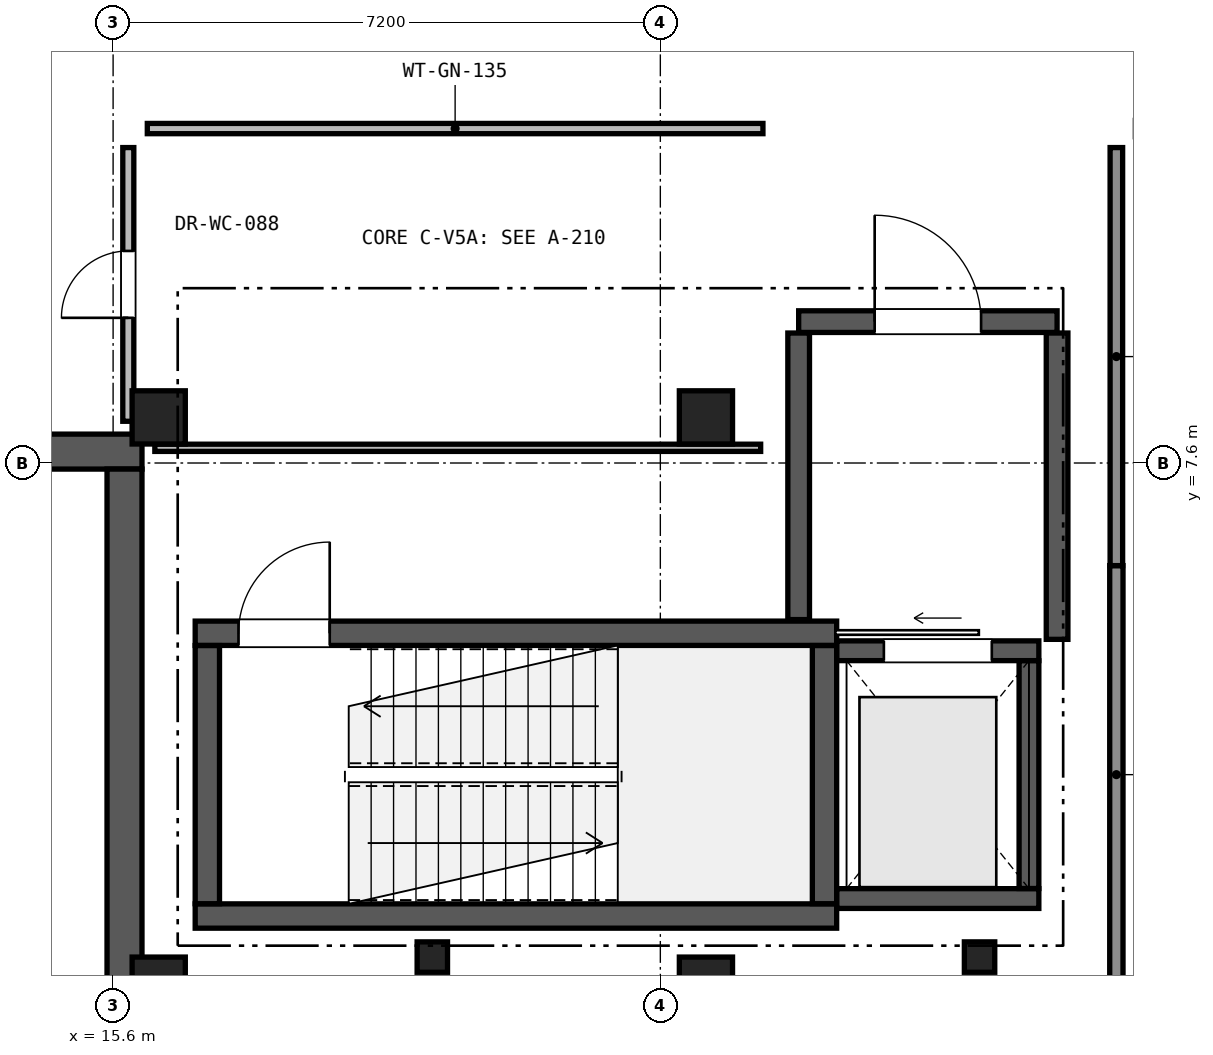
"""IFC4 building model, lengths in metres.
Left out: names, types, materials, properties, quantities, classifications, styles, units other than length and angle.
Written with IfcOpenShell. Run it as: python <this file> out.ifc"""

import sys

from ifc_helpers import new_model, si_unit, direction, frame, frame_2d, origin, origin_2d, place, context, subcontext, project, spatial, rectangle, extrude, element, fill, save


model = new_model("IFC4")
c1 = context("Model", 3, precision=1e-05, world=origin(), true_north=direction((0.0, 1.0)))
c2 = subcontext(c1, "Body", "Model", "MODEL_VIEW")
j1 = project(units=[si_unit("LENGTHUNIT", "METRE"), si_unit("PLANEANGLEUNIT", "RADIAN")], contexts=[c1])
p1 = place(None, origin())
s1 = spatial("IfcSite", under=j1, at=p1, CompositionType="ELEMENT")
p2 = place(p1, origin())
s2 = spatial("IfcBuilding", under=s1, at=p2, CompositionType="ELEMENT")
p3 = place(p2, frame((0.0, 0.0, -4.42)))
s3 = spatial("IfcBuildingStorey", under=s2, at=p3, CompositionType="ELEMENT", Elevation=-4.42)
for number, where, z_axis, x_axis in (
    (1, (16.2, 0.75, 0.0), (0.0, 0.0, 1.0), (1.0, 0.0, 0.0)),
    (2, (16.2, 8.2, 0.0), (0.0, 0.0, 1.0), (1.0, 0.0, 0.0)),
    (3, (23.4, 0.75, 0.0), (0.0, 0.0, 1.0), (1.0, 0.0, 0.0)),
    (4, (23.4, 8.2, 0.0), (0.0, 0.0, 1.0), (1.0, 0.0, 0.0)),
):
    element("IfcColumn", number, at=place(p3, frame(where, z_axis=z_axis, x_axis=x_axis)), inside=s3, PredefinedType="COLUMN", context=c2, shape_type="SweptSolid", body=[
        extrude(rectangle(XDim=0.7, YDim=0.7, at=origin_2d()), origin(), (0.0, 0.0, 1.0), 4.42),
    ])
for number, where, z_axis, x_axis in (
    (5, (19.8, 1.1, 0.0), (0.0, 0.0, 1.0), (1.0, 0.0, 0.0)),
    (6, (27.0, 1.1, 0.0), (0.0, 0.0, 1.0), (1.0, 0.0, 0.0)),
):
    element("IfcColumn", number, at=place(p3, frame(where, z_axis=z_axis, x_axis=x_axis)), inside=s3, PredefinedType="PILASTER", context=c2, shape_type="SweptSolid", body=[
        extrude(rectangle(XDim=0.4, YDim=0.4, at=origin_2d()), origin(), (0.0, 0.0, 1.0), 4.42),
    ])
p4 = place(p3, frame((8.78, 7.75, 0.0), z_axis=(0.0, 0.0, 1.0), x_axis=(1.0, 0.0, 0.0)))
e7 = element("IfcWall", 7, at=p4, inside=s3, PredefinedType="SHEAR", context=c2, shape_type="SweptSolid", body=[
    extrude(rectangle(XDim=7.2, YDim=0.46, at=frame_2d((3.6, 0.0))), origin(), (0.0, 0.0, 1.0), 4.105),
])
p5 = place(p3, frame((15.75, 7.52, 0.0), z_axis=(0.0, 0.0, 1.0), x_axis=(0.0, -1.0, 0.0)))
e8 = element("IfcWall", 8, at=p5, inside=s3, PredefinedType="SHEAR", context=c2, shape_type="SweptSolid", body=[
    extrude(rectangle(XDim=7.14, YDim=0.46, at=frame_2d((3.57, 0.0))), origin(), (0.0, 0.0, 1.0), 4.105),
])
p6 = place(p3, frame((16.68, 1.64, 0.0), z_axis=(0.0, 0.0, 1.0), x_axis=(1.0, 0.0, 0.0)))
e9 = element("IfcWall", 9, at=p6, inside=s3, PredefinedType="SHEAR", context=c2, shape_type="SweptSolid", body=[
    extrude(rectangle(XDim=8.44, YDim=0.32, at=frame_2d((4.22, 0.0))), origin(), (0.0, 0.0, 1.0), 4.105),
])
p7 = place(p3, frame((16.68, 5.36, 0.0), z_axis=(0.0, 0.0, 1.0), x_axis=(1.0, 0.0, 0.0)))
e10 = element("IfcWall", 10, at=p7, inside=s3, PredefinedType="SHEAR", context=c2, shape_type="SweptSolid", body=[
    extrude(rectangle(XDim=8.44, YDim=0.32, at=frame_2d((4.22, 0.0))), origin(), (0.0, 0.0, 1.0), 4.105),
])
p8 = place(p7, frame((0.57, 0.0, 0.0)))
e11 = element("IfcOpeningElement", 11, at=p8, cuts=e10, PredefinedType="OPENING", context=c2, shape_type="SweptSolid", body=[
    extrude(rectangle(XDim=1.2, YDim=2.2, at=frame_2d((0.6, 1.1))), frame((0.0, 0.17, 0.0), z_axis=(0.0, -1.0, 0.0), x_axis=(1.0, 0.0, 0.0)), (0.0, 0.0, 1.0), 0.34),
])
for number, where, z_axis, x_axis in (
    (12, (16.84, 1.802, 0.0), (0.0, 0.0, 1.0), (0.0, 1.0, 0.0)),
    (13, (24.96, 1.802, 0.0), (0.0, 0.0, 1.0), (0.0, 1.0, 0.0)),
):
    element("IfcWall", number, at=place(p3, frame(where, z_axis=z_axis, x_axis=x_axis)), inside=s3, PredefinedType="SHEAR", context=c2, shape_type="SweptSolid", body=[
        extrude(rectangle(XDim=3.396, YDim=0.32, at=frame_2d((1.698, 0.0))), origin(), (0.0, 0.0, 1.0), 4.105),
    ])
p9 = place(p3, frame((25.122, 1.87, 0.0), z_axis=(0.0, 0.0, 1.0), x_axis=(1.0, 0.0, 0.0)))
e14 = element("IfcWall", 14, at=p9, inside=s3, PredefinedType="SHEAR", context=c2, shape_type="SweptSolid", body=[
    extrude(rectangle(XDim=2.658, YDim=0.26, at=frame_2d((1.329, 0.0))), origin(), (0.0, 0.0, 1.0), 4.105),
])
p10 = place(p3, frame((25.122, 5.13, 0.0), z_axis=(0.0, 0.0, 1.0), x_axis=(1.0, 0.0, 0.0)))
e15 = element("IfcWall", 15, at=p10, inside=s3, PredefinedType="SHEAR", context=c2, shape_type="SweptSolid", body=[
    extrude(rectangle(XDim=2.658, YDim=0.26, at=frame_2d((1.329, 0.0))), origin(), (0.0, 0.0, 1.0), 4.105),
])
p11 = place(p10, frame((0.619, 0.0, 0.0)))
e16 = element("IfcOpeningElement", 16, at=p11, cuts=e15, PredefinedType="OPENING", context=c2, shape_type="SweptSolid", body=[
    extrude(rectangle(XDim=1.42, YDim=2.25, at=frame_2d((0.71, 1.125))), frame((0.0, 0.14, 0.0), z_axis=(0.0, -1.0, 0.0), x_axis=(1.0, 0.0, 0.0)), (0.0, 0.0, 1.0), 0.28),
])
p12 = place(p3, frame((27.65, 2.002, 0.0), z_axis=(0.0, 0.0, 1.0), x_axis=(0.0, 1.0, 0.0)))
e17 = element("IfcWall", 17, at=p12, inside=s3, PredefinedType="SHEAR", context=c2, shape_type="SweptSolid", body=[
    extrude(rectangle(XDim=2.996, YDim=0.26, at=frame_2d((1.498, 0.0))), origin(), (0.0, 0.0, 1.0), 4.105),
])
p13 = place(p3, frame((24.62, 9.46, 0.0), z_axis=(0.0, 0.0, 1.0), x_axis=(1.0, 0.0, 0.0)))
e18 = element("IfcWall", 18, at=p13, inside=s3, PredefinedType="SHEAR", context=c2, shape_type="SweptSolid", body=[
    extrude(rectangle(XDim=3.4, YDim=0.285, at=frame_2d((1.7, 0.0))), origin(), (0.0, 0.0, 1.0), 4.105),
])
p14 = place(p13, frame((1.0, 0.0, 0.0)))
e19 = element("IfcOpeningElement", 19, at=p14, cuts=e18, PredefinedType="OPENING", context=c2, shape_type="SweptSolid", body=[
    extrude(rectangle(XDim=1.4, YDim=2.25, at=frame_2d((0.7, 1.125))), frame((0.0, 0.152, 0.0), z_axis=(0.0, -1.0, 0.0), x_axis=(1.0, 0.0, 0.0)), (0.0, 0.0, 1.0), 0.305),
])
p15 = place(p3, frame((24.62, 5.54, 0.0), z_axis=(0.0, 0.0, 1.0), x_axis=(0.0, 1.0, 0.0)))
e20 = element("IfcWall", 20, at=p15, inside=s3, PredefinedType="SHEAR", context=c2, shape_type="SweptSolid", body=[
    extrude(rectangle(XDim=3.77, YDim=0.285, at=frame_2d((1.885, 0.0))), origin(), (0.0, 0.0, 1.0), 3.555),
])
p16 = place(p3, frame((28.02, 5.28, 0.0), z_axis=(0.0, 0.0, 1.0), x_axis=(0.0, 1.0, 0.0)))
e21 = element("IfcWall", 21, at=p16, inside=s3, PredefinedType="SHEAR", context=c2, shape_type="SweptSolid", body=[
    extrude(rectangle(XDim=4.03, YDim=0.285, at=frame_2d((2.015, 0.0))), origin(), (0.0, 0.0, 1.0), 3.555),
])
p17 = place(p3, frame((28.8, 0.75, 0.0), z_axis=(0.0, 0.0, 1.0), x_axis=(0.0, 1.0, 0.0)))
e22 = element("IfcWall", 22, at=p17, inside=s3, PredefinedType="PARTITIONING", context=c2, shape_type="SweptSolid", body=[
    extrude(rectangle(XDim=5.5, YDim=0.175, at=frame_2d((2.75, 0.0))), origin(), (0.0, 0.0, 1.0), 3.555),
])
p18 = place(p3, frame((28.8, 6.25, 0.0), z_axis=(0.0, 0.0, 1.0), x_axis=(0.0, 1.0, 0.0)))
e23 = element("IfcWall", 23, at=p18, inside=s3, PredefinedType="PARTITIONING", context=c2, shape_type="SweptSolid", body=[
    extrude(rectangle(XDim=5.5, YDim=0.165, at=frame_2d((2.75, 0.0))), origin(), (0.0, 0.0, 1.0), 3.555),
])
p19 = place(p3, frame((24.12, 7.8, 0.0), z_axis=(0.0, 0.0, 1.0), x_axis=(-1.0, 0.0, 0.0)))
e24 = element("IfcWall", 24, at=p19, inside=s3, PredefinedType="PARTITIONING", context=c2, shape_type="SweptSolid", body=[
    extrude(rectangle(XDim=7.971, YDim=0.095, at=frame_2d((3.986, 0.0))), origin(), (0.0, 0.0, 1.0), 3.555),
])
p20 = place(p3, frame((15.8, 8.149, 0.0), z_axis=(0.0, 0.0, 1.0), x_axis=(0.0, 1.0, 0.0)))
e25 = element("IfcWall", 25, at=p20, inside=s3, PredefinedType="PARTITIONING", context=c2, shape_type="SweptSolid", body=[
    extrude(rectangle(XDim=3.601, YDim=0.145, at=frame_2d((1.801, 0.0))), origin(), (0.0, 0.0, 1.0), 3.555),
])
p21 = place(p20, frame((1.361, 0.0, 0.0)))
e26 = element("IfcOpeningElement", 26, at=p21, cuts=e25, PredefinedType="OPENING", context=c2, shape_type="SweptSolid", body=[
    extrude(rectangle(XDim=0.88, YDim=2.1, at=frame_2d((0.44, 1.05))), frame((0.0, 0.083, 0.0), z_axis=(0.0, -1.0, 0.0), x_axis=(1.0, 0.0, 0.0)), (0.0, 0.0, 1.0), 0.165),
])
p22 = place(p3, frame((16.05, 12.0, 0.0), z_axis=(0.0, 0.0, 1.0), x_axis=(1.0, 0.0, 0.0)))
e27 = element("IfcWall", 27, at=p22, inside=s3, PredefinedType="PARTITIONING", context=c2, shape_type="SweptSolid", body=[
    extrude(rectangle(XDim=8.1, YDim=0.135, at=frame_2d((4.05, 0.0))), origin(), (0.0, 0.0, 1.0), 3.555),
])
p23 = place(p8, origin())
e28 = element("IfcDoor", 28, at=p23, inside=s3, OperationType="SINGLE_SWING_RIGHT", PredefinedType="DOOR", context=c2, shape_type="SweptSolid", body=[
    extrude(rectangle(XDim=1.2, YDim=2.2, at=frame_2d((0.6, 1.1))), frame((0.0, 0.025, 0.0), z_axis=(0.0, -1.0, 0.0), x_axis=(1.0, 0.0, 0.0)), (0.0, 0.0, 1.0), 0.05),
])
fill(e11, e28)
p24 = place(p11, origin())
e29 = element("IfcDoor", 29, at=p24, inside=s3, OperationType="SLIDING_TO_LEFT", PredefinedType="DOOR", context=c2, shape_type="SweptSolid", body=[
    extrude(rectangle(XDim=1.42, YDim=2.25, at=frame_2d((0.71, 1.125))), frame((0.0, 0.025, 0.0), z_axis=(0.0, -1.0, 0.0), x_axis=(1.0, 0.0, 0.0)), (0.0, 0.0, 1.0), 0.05),
])
fill(e16, e29)
p25 = place(p14, origin())
e30 = element("IfcDoor", 30, at=p25, inside=s3, OperationType="SINGLE_SWING_LEFT", PredefinedType="DOOR", context=c2, shape_type="SweptSolid", body=[
    extrude(rectangle(XDim=1.4, YDim=2.25, at=frame_2d((0.7, 1.125))), frame((0.0, 0.025, 0.0), z_axis=(0.0, -1.0, 0.0), x_axis=(1.0, 0.0, 0.0)), (0.0, 0.0, 1.0), 0.05),
])
fill(e19, e30)
p26 = place(p21, origin())
e31 = element("IfcDoor", 31, at=p26, inside=s3, OperationType="SINGLE_SWING_LEFT", PredefinedType="DOOR", context=c2, shape_type="SweptSolid", body=[
    extrude(rectangle(XDim=0.88, YDim=2.1, at=frame_2d((0.44, 1.05))), frame((0.0, 0.025, 0.0), z_axis=(0.0, -1.0, 0.0), x_axis=(1.0, 0.0, 0.0)), (0.0, 0.0, 1.0), 0.05),
])
fill(e26, e31)
save(model, sys.argv[1])
